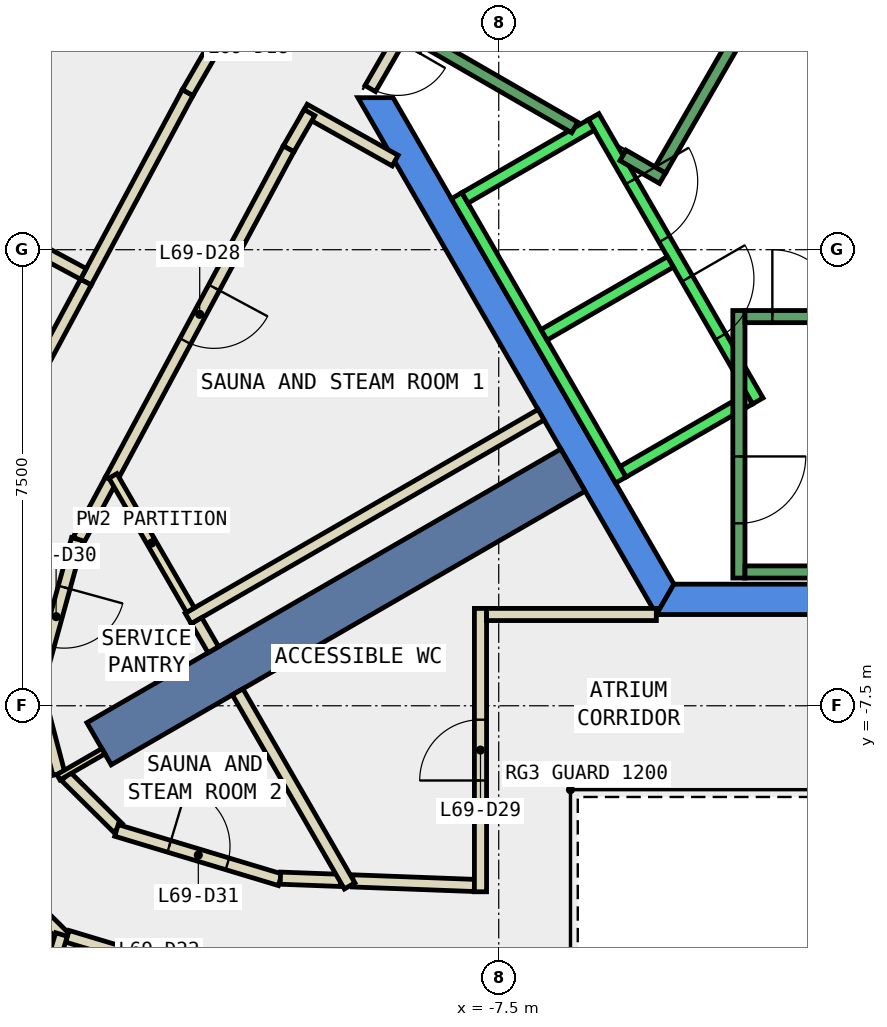
"""IFC4 building model, lengths in metres.
Left out: names, types, materials, properties, quantities, classifications, styles, units other than length and angle.
Written with IfcOpenShell. Run it as: python <this file> out.ifc"""

import sys

from ifc_helpers import new_model, si_unit, direction, frame, frame_2d, origin, place, context, subcontext, project, spatial, polyline, rectangle, outline, extrude, element, fill, save


model = new_model("IFC4")
c1 = context("Model", 3, precision=1e-05, world=origin(), true_north=direction((0.0, 1.0)))
c2 = subcontext(c1, "Body", "Model", "MODEL_VIEW")
j1 = project(units=[si_unit("LENGTHUNIT", "METRE"), si_unit("PLANEANGLEUNIT", "RADIAN")], contexts=[c1])
p1 = place(None, origin())
s1 = spatial("IfcSite", under=j1, at=p1, CompositionType="ELEMENT")
p2 = place(p1, origin())
s2 = spatial("IfcBuilding", under=s1, at=p2, CompositionType="ELEMENT")
p3 = place(p2, frame((0.0, 0.0, 297.2)))
s3 = spatial("IfcBuildingStorey", under=s2, at=p3, CompositionType="ELEMENT", Elevation=297.2)
p4 = place(p3, frame((0.0, 0.0, -0.34)))
e1 = element("IfcWall", 1, at=p4, inside=s3, PredefinedType="SHEAR", context=c2, shape_type="SweptSolid", body=[
    extrude(outline(polyline([(-9.236, 3.502), (-8.803, 3.253), (-4.619, 10.5), (-4.907, 11.0), (-9.236, 3.502)])), origin(), (0.0, 0.0, 1.0), 3.6),
])
p5 = place(p3, frame((0.0, 0.0, -0.34)))
e2 = element("IfcWall", 2, at=p5, inside=s3, PredefinedType="SHEAR", context=c2, shape_type="SweptSolid", body=[
    extrude(outline(polyline([(-9.815, 2.5), (-4.907, -6.0), (-4.619, -5.5), (-9.238, 2.5), (-9.815, 2.5)])), origin(), (0.0, 0.0, 1.0), 3.6),
])
p6 = place(p3, frame((0.0, 0.0, -0.34)))
e3 = element("IfcWall", 3, at=p6, inside=s3, PredefinedType="SHEAR", context=c2, shape_type="SweptSolid", body=[
    extrude(outline(polyline([(3.75, -6.0), (3.75, -5.5), (-4.619, -5.5), (-4.907, -6.0), (3.75, -6.0)])), origin(), (0.0, 0.0, 1.0), 3.6),
])
p7 = place(p3, frame((-6.279, -3.625, -0.34), z_axis=(0.0, 0.0, 1.0), x_axis=(-0.866017533419, -0.500013631625, 0.0)))
e4 = element("IfcWall", 4, at=p7, inside=s3, PredefinedType="SHEAR", context=c2, shape_type="SweptSolid", body=[
    extrude(rectangle(XDim=9.0, YDim=0.8, at=frame_2d((4.5, 0.0))), origin(), (0.0, 0.0, 1.0), 3.6),
])
p8 = place(p3, frame((-9.203, 1.465, 0.0), z_axis=(0.0, 0.0, 1.0), x_axis=(-0.872243753731, 0.489071399775, 0.0)))
e5 = element("IfcWall", 5, at=p8, inside=s3, PredefinedType="PARTITIONING", context=c2, shape_type="SweptSolid", body=[
    extrude(rectangle(XDim=1.715, YDim=0.2, at=frame_2d((0.858, 0.0))), origin(), (0.0, 0.0, 1.0), 3.26),
])
p9 = place(p3, frame((-10.612, 2.255, 0.0), z_axis=(0.0, 0.0, 1.0), x_axis=(-0.499916971989, -0.866073334723, 0.0)))
e6 = element("IfcWall", 6, at=p9, inside=s3, PredefinedType="PARTITIONING", context=c2, shape_type="SweptSolid", body=[
    extrude(rectangle(XDim=0.688, YDim=0.2, at=frame_2d((0.344, 0.0))), origin(), (0.0, 0.0, 1.0), 3.26),
])
p10 = place(p3, frame((-10.956, 1.659, 0.0), z_axis=(0.0, 0.0, 1.0), x_axis=(-0.473095976848, -0.881010894762, 0.0)))
e7 = element("IfcWall", 7, at=p10, inside=s3, PredefinedType="PARTITIONING", context=c2, shape_type="SweptSolid", body=[
    extrude(rectangle(XDim=6.18, YDim=0.2, at=frame_2d((3.09, 0.0))), origin(), (0.0, 0.0, 1.0), 3.26),
])
p11 = place(p10, frame((2.59, 0.0, 0.0)))
e8 = element("IfcOpeningElement", 8, at=p11, cuts=e7, PredefinedType="OPENING", context=c2, shape_type="SweptSolid", body=[
    extrude(rectangle(XDim=1.0, YDim=2.1, at=frame_2d((0.5, 1.05))), frame((0.0, 0.11, 0.0), z_axis=(0.0, -1.0, 0.0), x_axis=(1.0, 0.0, 0.0)), (0.0, 0.0, 1.0), 0.22),
])
p12 = place(p3, frame((-9.902, -10.38, 0.0), z_axis=(0.0, 0.0, 1.0), x_axis=(0.999295503749, -0.037529937222, 0.0)))
e9 = element("IfcWall", 9, at=p12, inside=s3, PredefinedType="PARTITIONING", context=c2, shape_type="SweptSolid", body=[
    extrude(rectangle(XDim=2.004, YDim=0.2, at=frame_2d((1.002, 0.0))), origin(), (0.0, 0.0, 1.0), 3.26),
])
p13 = place(p3, frame((-13.88, -3.786, 0.0), z_axis=(0.0, 0.0, 1.0), x_axis=(-0.473500327913, -0.880793641817, 0.0)))
e10 = element("IfcWall", 10, at=p13, inside=s3, PredefinedType="PARTITIONING", context=c2, shape_type="SweptSolid", body=[
    extrude(rectangle(XDim=1.117, YDim=0.2, at=frame_2d((0.559, 0.0))), origin(), (0.0, 0.0, 1.0), 3.26),
])
p14 = place(p3, frame((-14.429, -4.761, 0.0), z_axis=(0.0, 0.0, 1.0), x_axis=(-0.265321869293, -0.964159896321, 0.0)))
e11 = element("IfcWall", 11, at=p14, inside=s3, PredefinedType="PARTITIONING", context=c2, shape_type="SweptSolid", body=[
    extrude(rectangle(XDim=2.642, YDim=0.2, at=frame_2d((1.321, 0.0))), origin(), (0.0, 0.0, 1.0), 3.26),
])
p15 = place(p14, frame((0.821, 0.0, 0.0)))
e12 = element("IfcOpeningElement", 12, at=p15, cuts=e11, PredefinedType="OPENING", context=c2, shape_type="SweptSolid", body=[
    extrude(rectangle(XDim=1.0, YDim=2.1, at=frame_2d((0.5, 1.05))), frame((0.0, 0.11, 0.0), z_axis=(0.0, -1.0, 0.0), x_axis=(1.0, 0.0, 0.0)), (0.0, 0.0, 1.0), 0.22),
])
p16 = place(p3, frame((-15.078, -7.309, 0.0), z_axis=(0.0, 0.0, 1.0), x_axis=(0.254014079025, -0.967200520914, 0.0)))
e13 = element("IfcWall", 13, at=p16, inside=s3, PredefinedType="PARTITIONING", context=c2, shape_type="SweptSolid", body=[
    extrude(rectangle(XDim=1.354, YDim=0.2, at=frame_2d((0.677, 0.0))), origin(), (0.0, 0.0, 1.0), 3.26),
])
p17 = place(p3, frame((-14.62, -8.66, 0.0), z_axis=(0.0, 0.0, 1.0), x_axis=(0.710838137113, -0.703355630407, 0.0)))
e14 = element("IfcWall", 14, at=p17, inside=s3, PredefinedType="PARTITIONING", context=c2, shape_type="SweptSolid", body=[
    extrude(rectangle(XDim=1.207, YDim=0.2, at=frame_2d((0.604, 0.0))), origin(), (0.0, 0.0, 1.0), 3.26),
])
p18 = place(p3, frame((-13.787, -9.55, 0.0), z_axis=(0.0, 0.0, 1.0), x_axis=(0.957493454064, -0.288454997225, 0.0)))
e15 = element("IfcWall", 15, at=p18, inside=s3, PredefinedType="PARTITIONING", context=c2, shape_type="SweptSolid", body=[
    extrude(rectangle(XDim=2.812, YDim=0.2, at=frame_2d((1.406, 0.0))), origin(), (0.0, 0.0, 1.0), 3.26),
])
p19 = place(p18, frame((0.906, 0.0, 0.0)))
e16 = element("IfcOpeningElement", 16, at=p19, cuts=e15, PredefinedType="OPENING", context=c2, shape_type="SweptSolid", body=[
    extrude(rectangle(XDim=1.0, YDim=2.1, at=frame_2d((0.5, 1.05))), frame((0.0, 0.11, 0.0), z_axis=(0.0, -1.0, 0.0), x_axis=(1.0, 0.0, 0.0)), (0.0, 0.0, 1.0), 0.22),
])
p20 = place(p3, frame((-11.091, -10.335, 0.0), z_axis=(0.0, 0.0, 1.0), x_axis=(0.999296807198, -0.037495214686, 0.0)))
e17 = element("IfcWall", 17, at=p20, inside=s3, PredefinedType="PARTITIONING", context=c2, shape_type="SweptSolid", body=[
    extrude(rectangle(XDim=0.99, YDim=0.2, at=frame_2d((0.495, 0.0))), origin(), (0.0, 0.0, 1.0), 3.26),
])
p21 = place(p3, frame((-14.29, -0.533, 0.0), z_axis=(0.0, 0.0, 1.0), x_axis=(0.473161350875, 0.880975786295, 0.0)))
e18 = element("IfcWall", 18, at=p21, inside=s3, PredefinedType="PARTITIONING", context=c2, shape_type="SweptSolid", body=[
    extrude(rectangle(XDim=3.538, YDim=0.2, at=frame_2d((1.769, 0.0))), origin(), (0.0, 0.0, 1.0), 3.26),
])
p22 = place(p3, frame((-12.616, 2.584, 0.0), z_axis=(0.0, 0.0, 1.0), x_axis=(0.50008212199, 0.86597798544, 0.0)))
e19 = element("IfcWall", 19, at=p22, inside=s3, PredefinedType="PARTITIONING", context=c2, shape_type="SweptSolid", body=[
    extrude(rectangle(XDim=3.995, YDim=0.2, at=frame_2d((1.998, 0.0))), origin(), (0.0, 0.0, 1.0), 3.26),
])
p23 = place(p22, frame((1.498, 0.0, 0.0)))
e20 = element("IfcOpeningElement", 20, at=p23, cuts=e19, PredefinedType="OPENING", context=c2, shape_type="SweptSolid", body=[
    extrude(rectangle(XDim=1.0, YDim=2.1, at=frame_2d((0.5, 1.05))), frame((0.0, 0.11, 0.0), z_axis=(0.0, -1.0, 0.0), x_axis=(1.0, 0.0, 0.0)), (0.0, 0.0, 1.0), 0.22),
])
p24 = place(p3, frame((-15.71, -3.176, 0.0), z_axis=(0.0, 0.0, 1.0), x_axis=(0.473255284848, 0.880925329051, 0.0)))
e21 = element("IfcWall", 21, at=p24, inside=s3, PredefinedType="PARTITIONING", context=c2, shape_type="SweptSolid", body=[
    extrude(rectangle(XDim=3.0, YDim=0.2, at=frame_2d((1.5, 0.0))), origin(), (0.0, 0.0, 1.0), 3.26),
])
p25 = place(p3, frame((-14.62, -11.333, 0.0), z_axis=(0.0, 0.0, 1.0), x_axis=(-0.710808598142, 0.703385482369, 0.0)))
e22 = element("IfcWall", 22, at=p25, inside=s3, PredefinedType="PARTITIONING", context=c2, shape_type="SweptSolid", body=[
    extrude(rectangle(XDim=2.697, YDim=0.2, at=frame_2d((1.349, 0.0))), origin(), (0.0, 0.0, 1.0), 3.26),
])
p26 = place(p3, frame((-12.968, -11.781, 0.0), z_axis=(0.0, 0.0, 1.0), x_axis=(-0.957517271828, 0.288375925054, 0.0)))
e23 = element("IfcWall", 23, at=p26, inside=s3, PredefinedType="PARTITIONING", context=c2, shape_type="SweptSolid", body=[
    extrude(rectangle(XDim=1.699, YDim=0.2, at=frame_2d((0.85, 0.0))), origin(), (0.0, 0.0, 1.0), 3.26),
])
p27 = place(p3, frame((-2.54, 5.1, 0.0), z_axis=(0.0, 0.0, 1.0), x_axis=(0.499925051871, -0.866068670783, 0.0)))
e24 = element("IfcWall", 24, at=p27, inside=s3, PredefinedType="PARTITIONING", context=c2, shape_type="SweptSolid", body=[
    extrude(rectangle(XDim=5.181, YDim=0.2, at=frame_2d((2.59, 0.0))), origin(), (0.0, 0.0, 1.0), 3.26),
])
p28 = place(p27, frame((2.04, 0.0, 0.0)))
e25 = element("IfcOpeningElement", 25, at=p28, cuts=e24, PredefinedType="OPENING", context=c2, shape_type="SweptSolid", body=[
    extrude(rectangle(XDim=1.0, YDim=2.1, at=frame_2d((0.5, 1.05))), frame((0.0, 0.11, 0.0), z_axis=(0.0, -1.0, 0.0), x_axis=(1.0, 0.0, 0.0)), (0.0, 0.0, 1.0), 0.22),
])
p29 = place(p3, frame((-7.8, -10.559, 0.0), z_axis=(0.0, 0.0, 1.0), x_axis=(0.0, 1.0, 0.0)))
e26 = element("IfcWall", 26, at=p29, inside=s3, PredefinedType="PARTITIONING", context=c2, shape_type="SweptSolid", body=[
    extrude(rectangle(XDim=4.66, YDim=0.2, at=frame_2d((2.33, 0.0))), origin(), (0.0, 0.0, 1.0), 3.26),
])
p30 = place(p29, frame((1.83, 0.0, 0.0)))
e27 = element("IfcOpeningElement", 27, at=p30, cuts=e26, PredefinedType="OPENING", context=c2, shape_type="SweptSolid", body=[
    extrude(rectangle(XDim=1.0, YDim=2.1, at=frame_2d((0.5, 1.05))), frame((0.0, 0.11, 0.0), z_axis=(0.0, -1.0, 0.0), x_axis=(1.0, 0.0, 0.0)), (0.0, 0.0, 1.0), 0.22),
])
p31 = place(p3, frame((-7.7, -5.999, 0.0), z_axis=(0.0, 0.0, 1.0), x_axis=(1.0, 0.0, 0.0)))
e28 = element("IfcWall", 28, at=p31, inside=s3, PredefinedType="PARTITIONING", context=c2, shape_type="SweptSolid", body=[
    extrude(rectangle(XDim=2.792, YDim=0.2, at=frame_2d((1.396, 0.0))), origin(), (0.0, 0.0, 1.0), 3.26),
])
p32 = place(p3, frame((-6.804, -2.714, 0.0), z_axis=(0.0, 0.0, 1.0), x_axis=(-0.866057565063, -0.499944290893, 0.0)))
e29 = element("IfcWall", 29, at=p32, inside=s3, PredefinedType="PARTITIONING", context=c2, shape_type="SweptSolid", body=[
    extrude(rectangle(XDim=6.7, YDim=0.2, at=frame_2d((3.35, 0.0))), origin(), (0.0, 0.0, 1.0), 3.26),
])
p33 = place(p3, frame((-12.57, -5.927, 0.0), z_axis=(0.0, 0.0, 1.0), x_axis=(-0.500197803108, 0.865911171983, 0.0)))
e30 = element("IfcWall", 30, at=p33, inside=s3, PredefinedType="PARTITIONING", context=c2, shape_type="SweptSolid", body=[
    extrude(rectangle(XDim=2.549, YDim=0.15, at=frame_2d((1.274, 0.0))), origin(), (0.0, 0.0, 1.0), 3.26),
])
p34 = place(p3, frame((-12.194, -6.578, 0.0), z_axis=(0.0, 0.0, 1.0), x_axis=(-0.500809139387, 0.865557742676, 0.0)))
e31 = element("IfcWall", 31, at=p34, inside=s3, PredefinedType="PARTITIONING", context=c2, shape_type="SweptSolid", body=[
    extrude(rectangle(XDim=0.551, YDim=0.2, at=frame_2d((0.275, 0.0))), origin(), (0.0, 0.0, 1.0), 3.26),
])
p35 = place(p3, frame((-9.952, -10.463, 0.0), z_axis=(0.0, 0.0, 1.0), x_axis=(-0.499837150608, 0.866119404512, 0.0)))
e32 = element("IfcWall", 32, at=p35, inside=s3, PredefinedType="PARTITIONING", context=c2, shape_type="SweptSolid", body=[
    extrude(rectangle(XDim=3.685, YDim=0.2, at=frame_2d((1.843, 0.0))), origin(), (0.0, 0.0, 1.0), 3.26),
])
p36 = place(p3, frame((-14.002, -8.248, 0.0), z_axis=(0.0, 0.0, 1.0), x_axis=(-0.866142766235, -0.499796667154, 0.0)))
e33 = element("IfcWall", 33, at=p36, inside=s3, PredefinedType="PARTITIONING", context=c2, shape_type="SweptSolid", body=[
    extrude(rectangle(XDim=0.854, YDim=0.1, at=frame_2d((0.427, 0.0))), origin(), (0.0, 0.0, 1.0), 3.26),
])
p37 = place(p3, frame((-14.331, -0.398, 0.0), z_axis=(0.0, 0.0, 1.0), x_axis=(-0.880875830026, 0.473347411608, 0.0)))
e34 = element("IfcWall", 34, at=p37, inside=s3, PredefinedType="PARTITIONING", context=c2, shape_type="SweptSolid", body=[
    extrude(rectangle(XDim=2.4, YDim=0.2, at=frame_2d((1.2, 0.0))), origin(), (0.0, 0.0, 1.0), 3.26),
])
p38 = place(p3, frame((-14.691, -11.262, 0.0), z_axis=(0.0, 0.0, 1.0), x_axis=(-0.288440595492, -0.95749779262, 0.0)))
e35 = element("IfcWall", 35, at=p38, inside=s3, PredefinedType="PARTITIONING", context=c2, shape_type="SweptSolid", body=[
    extrude(rectangle(XDim=2.5, YDim=0.2, at=frame_2d((1.25, 0.0))), origin(), (0.0, 0.0, 1.0), 3.26),
])
p39 = place(p3, frame((-9.15, 3.452, 0.0), z_axis=(0.0, 0.0, 1.0), x_axis=(-0.500079945886, -0.865979242085, 0.0)))
e36 = element("IfcWall", 36, at=p39, inside=s3, PredefinedType="PARTITIONING", context=c2, shape_type="SweptSolid", body=[
    extrude(rectangle(XDim=0.926, YDim=0.2, at=frame_2d((0.463, 0.0))), origin(), (0.0, 0.0, 1.0), 2.4),
])
p40 = place(p39, frame((0.017, 0.0, 0.0)))
e37 = element("IfcOpeningElement", 37, at=p40, cuts=e36, PredefinedType="OPENING", context=c2, shape_type="SweptSolid", body=[
    extrude(rectangle(XDim=0.9, YDim=2.1, at=frame_2d((0.45, 1.05))), frame((0.0, 0.11, 0.0), z_axis=(0.0, -1.0, 0.0), x_axis=(1.0, 0.0, 0.0)), (0.0, 0.0, 1.0), 0.22),
])
p41 = place(p3, frame((-5.94, 2.188, 0.0), z_axis=(0.0, 0.0, 1.0), x_axis=(0.500034260056, -0.866005622828, 0.0)))
e38 = element("IfcWall", 38, at=p41, inside=s3, PredefinedType="STANDARD", context=c2, shape_type="SweptSolid", body=[
    extrude(rectangle(XDim=5.399, YDim=0.2, at=frame_2d((2.7, 0.0))), origin(), (0.0, 0.0, 1.0), 3.26),
])
p42 = place(p41, frame((3.075, 0.0, 0.0)))
e39 = element("IfcOpeningElement", 39, at=p42, cuts=e38, PredefinedType="OPENING", context=c2, shape_type="SweptSolid", body=[
    extrude(rectangle(XDim=1.1, YDim=2.1, at=frame_2d((0.55, 1.05))), frame((0.0, 0.11, 0.0), z_axis=(0.0, -1.0, 0.0), x_axis=(1.0, 0.0, 0.0)), (0.0, 0.0, 1.0), 0.22),
])
p43 = place(p41, frame((1.225, 0.0, 0.0)))
e40 = element("IfcOpeningElement", 40, at=p43, cuts=e38, PredefinedType="OPENING", context=c2, shape_type="SweptSolid", body=[
    extrude(rectangle(XDim=1.1, YDim=2.1, at=frame_2d((0.55, 1.05))), frame((0.0, 0.11, 0.0), z_axis=(0.0, -1.0, 0.0), x_axis=(1.0, 0.0, 0.0)), (0.0, 0.0, 1.0), 0.22),
])
p44 = place(p3, frame((-8.192, 0.888, 0.0), z_axis=(0.0, 0.0, 1.0), x_axis=(0.500034260056, -0.866005622828, 0.0)))
e41 = element("IfcWall", 41, at=p44, inside=s3, PredefinedType="STANDARD", context=c2, shape_type="SweptSolid", body=[
    extrude(rectangle(XDim=5.399, YDim=0.2, at=frame_2d((2.7, 0.0))), origin(), (0.0, 0.0, 1.0), 3.26),
])
for number, where, z_axis, x_axis in (
    (42, (-5.977, 2.052, 0.0), (0.0, 0.0, 1.0), (-0.866, -0.5, 0.0)),
    (43, (-4.677, -0.2, 0.0), (0.0, 0.0, 1.0), (-0.866, -0.5, 0.0)),
):
    element("IfcWall", number, at=place(p3, frame(where, z_axis=z_axis, x_axis=x_axis)), inside=s3, PredefinedType="STANDARD", context=c2, shape_type="SweptSolid", body=[
        extrude(rectangle(XDim=2.399, YDim=0.2, at=frame_2d((1.2, 0.0))), origin(), (0.0, 0.0, 1.0), 3.26),
    ])
p45 = place(p3, frame((-3.377, -2.452, 0.0), z_axis=(0.0, 0.0, 1.0), x_axis=(-0.865955154139, -0.50012165622, 0.0)))
e44 = element("IfcWall", 44, at=p45, inside=s3, PredefinedType="STANDARD", context=c2, shape_type="SweptSolid", body=[
    extrude(rectangle(XDim=2.4, YDim=0.2, at=frame_2d((1.2, 0.0))), origin(), (0.0, 0.0, 1.0), 3.26),
])
p46 = place(p3, frame((-3.55, -1.0, 0.0), z_axis=(0.0, 0.0, 1.0), x_axis=(0.0, -1.0, 0.0)))
e45 = element("IfcWall", 45, at=p46, inside=s3, PredefinedType="STANDARD", context=c2, shape_type="SweptSolid", body=[
    extrude(rectangle(XDim=4.4, YDim=0.2, at=frame_2d((2.2, 0.0))), origin(), (0.0, 0.0, 1.0), 3.26),
])
p47 = place(p46, frame((2.4, 0.0, 0.0)))
e46 = element("IfcOpeningElement", 46, at=p47, cuts=e45, PredefinedType="OPENING", context=c2, shape_type="SweptSolid", body=[
    extrude(rectangle(XDim=1.1, YDim=2.2, at=frame_2d((0.55, 1.1))), frame((0.0, 0.11, 0.0), z_axis=(0.0, -1.0, 0.0), x_axis=(1.0, 0.0, 0.0)), (0.0, 0.0, 1.0), 0.22),
])
p48 = place(p3, frame((-3.45, -1.1, 0.0), z_axis=(0.0, 0.0, 1.0), x_axis=(1.0, 0.0, 0.0)))
e47 = element("IfcWall", 47, at=p48, inside=s3, PredefinedType="STANDARD", context=c2, shape_type="SweptSolid", body=[
    extrude(rectangle(XDim=6.9, YDim=0.2, at=frame_2d((3.45, 0.0))), origin(), (0.0, 0.0, 1.0), 3.26),
])
p49 = place(p48, frame((0.45, 0.0, 0.0)))
e48 = element("IfcOpeningElement", 48, at=p49, cuts=e47, PredefinedType="OPENING", context=c2, shape_type="SweptSolid", body=[
    extrude(rectangle(XDim=1.1, YDim=2.2, at=frame_2d((0.55, 1.1))), frame((0.0, 0.11, 0.0), z_axis=(0.0, -1.0, 0.0), x_axis=(1.0, 0.0, 0.0)), (0.0, 0.0, 1.0), 0.22),
])
p50 = place(p3, frame((-3.45, -5.3, 0.0), z_axis=(0.0, 0.0, 1.0), x_axis=(1.0, 0.0, 0.0)))
e49 = element("IfcWall", 49, at=p50, inside=s3, PredefinedType="STANDARD", context=c2, shape_type="SweptSolid", body=[
    extrude(rectangle(XDim=6.9, YDim=0.2, at=frame_2d((3.45, 0.0))), origin(), (0.0, 0.0, 1.0), 3.26),
])
p51 = place(p3, frame((-6.25, 2.01, 0.0), z_axis=(0.0, 0.0, 1.0), x_axis=(-0.86611865017, 0.499838457731, 0.0)))
e50 = element("IfcWall", 50, at=p51, inside=s3, PredefinedType="STANDARD", context=c2, shape_type="SweptSolid", body=[
    extrude(rectangle(XDim=2.733, YDim=0.2, at=frame_2d((1.366, 0.0))), origin(), (0.0, 0.0, 1.0), 3.26),
])
p52 = place(p3, frame((-4.806, 1.176, 0.0), z_axis=(0.0, 0.0, 1.0), x_axis=(-0.866558586415, 0.499075361355, 0.0)))
e51 = element("IfcWall", 51, at=p52, inside=s3, PredefinedType="STANDARD", context=c2, shape_type="SweptSolid", body=[
    extrude(rectangle(XDim=0.751, YDim=0.2, at=frame_2d((0.376, 0.0))), origin(), (0.0, 0.0, 1.0), 3.26),
])
p53 = place(p3, frame((-1.393, 7.288, 0.0), z_axis=(0.0, 0.0, 1.0), x_axis=(-0.499963383562, -0.866046543262, 0.0)))
e52 = element("IfcWall", 52, at=p53, inside=s3, PredefinedType="STANDARD", context=c2, shape_type="SweptSolid", body=[
    extrude(rectangle(XDim=6.9, YDim=0.2, at=frame_2d((3.45, 0.0))), origin(), (0.0, 0.0, 1.0), 3.26),
])
p54 = place(p53, frame((0.45, 0.0, 0.0)))
e53 = element("IfcOpeningElement", 53, at=p54, cuts=e52, PredefinedType="OPENING", context=c2, shape_type="SweptSolid", body=[
    extrude(rectangle(XDim=1.1, YDim=2.2, at=frame_2d((0.55, 1.1))), frame((0.0, 0.11, 0.0), z_axis=(0.0, -1.0, 0.0), x_axis=(1.0, 0.0, 0.0)), (0.0, 0.0, 1.0), 0.22),
])
p55 = place(p11, origin())
e54 = element("IfcDoor", 54, at=p55, inside=s3, OperationType="SINGLE_SWING_LEFT", PredefinedType="DOOR", context=c2, shape_type="SweptSolid", body=[
    extrude(rectangle(XDim=1.0, YDim=2.1, at=frame_2d((0.5, 1.05))), frame((0.0, 0.025, 0.0), z_axis=(0.0, -1.0, 0.0), x_axis=(1.0, 0.0, 0.0)), (0.0, 0.0, 1.0), 0.05),
])
fill(e8, e54)
p56 = place(p30, origin())
e55 = element("IfcDoor", 55, at=p56, inside=s3, OperationType="SINGLE_SWING_LEFT", PredefinedType="DOOR", context=c2, shape_type="SweptSolid", body=[
    extrude(rectangle(XDim=1.0, YDim=2.1, at=frame_2d((0.5, 1.05))), frame((0.0, 0.025, 0.0), z_axis=(0.0, -1.0, 0.0), x_axis=(1.0, 0.0, 0.0)), (0.0, 0.0, 1.0), 0.05),
])
fill(e27, e55)
p57 = place(p15, origin())
e56 = element("IfcDoor", 56, at=p57, inside=s3, OperationType="SINGLE_SWING_LEFT", PredefinedType="DOOR", context=c2, shape_type="SweptSolid", body=[
    extrude(rectangle(XDim=1.0, YDim=2.1, at=frame_2d((0.5, 1.05))), frame((0.0, 0.025, 0.0), z_axis=(0.0, -1.0, 0.0), x_axis=(1.0, 0.0, 0.0)), (0.0, 0.0, 1.0), 0.05),
])
fill(e12, e56)
p58 = place(p19, origin())
e57 = element("IfcDoor", 57, at=p58, inside=s3, OperationType="SINGLE_SWING_LEFT", PredefinedType="DOOR", context=c2, shape_type="SweptSolid", body=[
    extrude(rectangle(XDim=1.0, YDim=2.1, at=frame_2d((0.5, 1.05))), frame((0.0, 0.025, 0.0), z_axis=(0.0, -1.0, 0.0), x_axis=(1.0, 0.0, 0.0)), (0.0, 0.0, 1.0), 0.05),
])
fill(e16, e57)
p59 = place(p40, origin())
e58 = element("IfcDoor", 58, at=p59, inside=s3, OperationType="SINGLE_SWING_LEFT", PredefinedType="DOOR", context=c2, shape_type="SweptSolid", body=[
    extrude(rectangle(XDim=0.9, YDim=2.1, at=frame_2d((0.45, 1.05))), frame((0.0, 0.025, 0.0), z_axis=(0.0, -1.0, 0.0), x_axis=(1.0, 0.0, 0.0)), (0.0, 0.0, 1.0), 0.05),
])
fill(e37, e58)
p60 = place(p42, origin())
e59 = element("IfcDoor", 59, at=p60, inside=s3, OperationType="SLIDING_TO_LEFT", PredefinedType="DOOR", context=c2, shape_type="SweptSolid", body=[
    extrude(rectangle(XDim=1.1, YDim=2.1, at=frame_2d((0.55, 1.05))), frame((0.0, 0.025, 0.0), z_axis=(0.0, -1.0, 0.0), x_axis=(1.0, 0.0, 0.0)), (0.0, 0.0, 1.0), 0.05),
])
fill(e39, e59)
p61 = place(p43, origin())
e60 = element("IfcDoor", 60, at=p61, inside=s3, OperationType="SLIDING_TO_LEFT", PredefinedType="DOOR", context=c2, shape_type="SweptSolid", body=[
    extrude(rectangle(XDim=1.1, YDim=2.1, at=frame_2d((0.55, 1.05))), frame((0.0, 0.025, 0.0), z_axis=(0.0, -1.0, 0.0), x_axis=(1.0, 0.0, 0.0)), (0.0, 0.0, 1.0), 0.05),
])
fill(e40, e60)
p62 = place(p49, origin())
e61 = element("IfcDoor", 61, at=p62, inside=s3, OperationType="SINGLE_SWING_LEFT", PredefinedType="DOOR", context=c2, shape_type="SweptSolid", body=[
    extrude(rectangle(XDim=1.1, YDim=2.2, at=frame_2d((0.55, 1.1))), frame((0.0, 0.025, 0.0), z_axis=(0.0, -1.0, 0.0), x_axis=(1.0, 0.0, 0.0)), (0.0, 0.0, 1.0), 0.05),
])
fill(e48, e61)
p63 = place(p47, origin())
e62 = element("IfcDoor", 62, at=p63, inside=s3, OperationType="SINGLE_SWING_LEFT", PredefinedType="DOOR", context=c2, shape_type="SweptSolid", body=[
    extrude(rectangle(XDim=1.1, YDim=2.2, at=frame_2d((0.55, 1.1))), frame((0.0, 0.025, 0.0), z_axis=(0.0, -1.0, 0.0), x_axis=(1.0, 0.0, 0.0)), (0.0, 0.0, 1.0), 0.05),
])
fill(e46, e62)
save(model, sys.argv[1])
